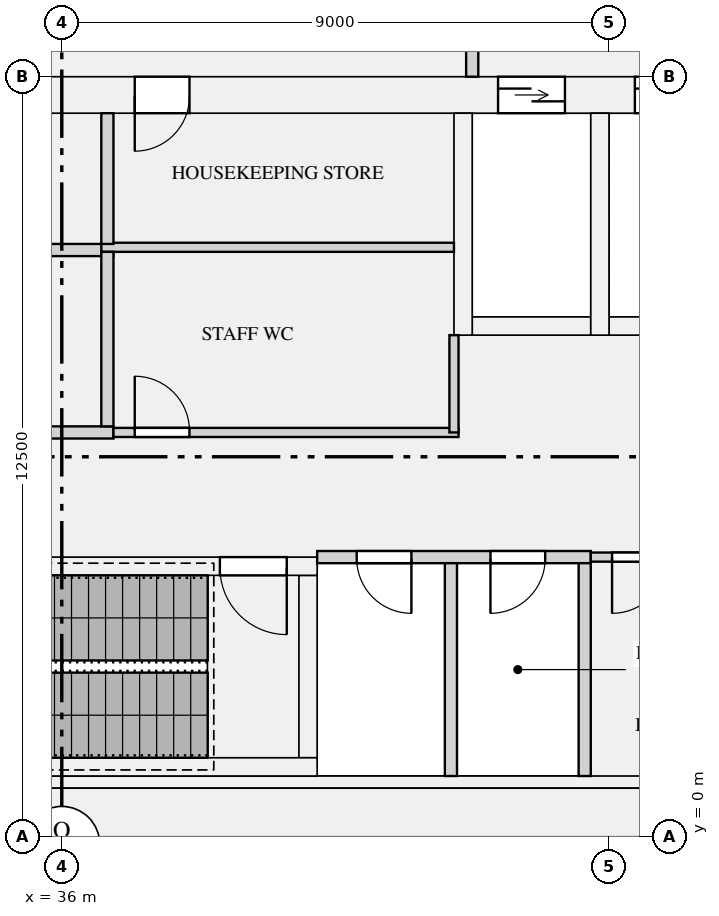
"""IFC4 building model, lengths in metres.
Left out: names, types, materials, properties, quantities, classifications, styles, units other than length and angle.
Written with IfcOpenShell. Run it as: python <this file> out.ifc"""

import sys

from ifc_helpers import new_model, si_unit, direction, frame, frame_2d, origin, place, context, subcontext, project, spatial, rectangle, extrude, element, fill, save


model = new_model("IFC4")
c1 = context("Model", 3, precision=1e-05, world=origin(), true_north=direction((0.0, 1.0)))
c2 = subcontext(c1, "Body", "Model", "MODEL_VIEW")
j1 = project(units=[si_unit("LENGTHUNIT", "METRE"), si_unit("PLANEANGLEUNIT", "RADIAN")], contexts=[c1])
p1 = place(None, origin())
s1 = spatial("IfcSite", under=j1, at=p1, CompositionType="ELEMENT")
p2 = place(p1, origin())
s2 = spatial("IfcBuilding", under=s1, at=p2, CompositionType="ELEMENT")
p3 = place(p2, frame((0.0, 0.0, 137.1)))
s3 = spatial("IfcBuildingStorey", under=s2, at=p3, CompositionType="ELEMENT", Elevation=137.1)
p4 = place(p3, frame((18.8, 0.4, 0.0), z_axis=(0.0, 0.0, 1.0), x_axis=(1.0, 0.0, 0.0)))
e1 = element("IfcWall", 1, at=p4, inside=s3, PredefinedType="SHEAR", context=c2, shape_type="SweptSolid", body=[
    extrude(rectangle(XDim=34.4, YDim=0.8, at=frame_2d((17.2, 0.0))), origin(), (0.0, 0.0, 1.0), 4.2),
])
p5 = place(p3, frame((18.8, 12.2, 0.0), z_axis=(0.0, 0.0, 1.0), x_axis=(1.0, 0.0, 0.0)))
e2 = element("IfcWall", 2, at=p5, inside=s3, PredefinedType="SHEAR", context=c2, shape_type="SweptSolid", body=[
    extrude(rectangle(XDim=34.4, YDim=0.6, at=frame_2d((17.2, 0.0))), origin(), (0.0, 0.0, 1.0), 4.2),
])
p6 = place(p5, frame((24.375, 0.0, 0.0)))
e3 = element("IfcOpeningElement", 3, at=p6, cuts=e2, PredefinedType="OPENING", context=c2, shape_type="SweptSolid", body=[
    extrude(rectangle(XDim=1.1, YDim=2.1, at=frame_2d((0.55, 1.05))), frame((0.0, 0.31, 0.0), z_axis=(0.0, -1.0, 0.0), x_axis=(1.0, 0.0, 0.0)), (0.0, 0.0, 1.0), 0.62),
])
p7 = place(p5, frame((26.625, 0.0, 0.0)))
e4 = element("IfcOpeningElement", 4, at=p7, cuts=e2, PredefinedType="OPENING", context=c2, shape_type="SweptSolid", body=[
    extrude(rectangle(XDim=1.1, YDim=2.1, at=frame_2d((0.55, 1.05))), frame((0.0, 0.31, 0.0), z_axis=(0.0, -1.0, 0.0), x_axis=(1.0, 0.0, 0.0)), (0.0, 0.0, 1.0), 0.62),
])
p8 = place(p5, frame((28.875, 0.0, 0.0)))
e5 = element("IfcOpeningElement", 5, at=p8, cuts=e2, PredefinedType="OPENING", context=c2, shape_type="SweptSolid", body=[
    extrude(rectangle(XDim=1.1, YDim=2.1, at=frame_2d((0.55, 1.05))), frame((0.0, 0.31, 0.0), z_axis=(0.0, -1.0, 0.0), x_axis=(1.0, 0.0, 0.0)), (0.0, 0.0, 1.0), 0.62),
])
p9 = place(p5, frame((18.4, 0.0, 0.0)))
e6 = element("IfcOpeningElement", 6, at=p9, cuts=e2, PredefinedType="OPENING", context=c2, shape_type="SweptSolid", body=[
    extrude(rectangle(XDim=0.9, YDim=2.1, at=frame_2d((0.45, 1.05))), frame((0.0, 0.31, 0.0), z_axis=(0.0, -1.0, 0.0), x_axis=(1.0, 0.0, 0.0)), (0.0, 0.0, 1.0), 0.62),
])
p10 = place(p5, frame((4.45, 0.0, 0.0)))
e7 = element("IfcOpeningElement", 7, at=p10, cuts=e2, PredefinedType="OPENING", context=c2, shape_type="SweptSolid", body=[
    extrude(rectangle(XDim=0.9, YDim=2.1, at=frame_2d((0.45, 1.05))), frame((0.0, 0.31, 0.0), z_axis=(0.0, -1.0, 0.0), x_axis=(1.0, 0.0, 0.0)), (0.0, 0.0, 1.0), 0.62),
])
p11 = place(p5, frame((1.35, 0.0, 0.0)))
e8 = element("IfcOpeningElement", 8, at=p11, cuts=e2, PredefinedType="OPENING", context=c2, shape_type="SweptSolid", body=[
    extrude(rectangle(XDim=1.2, YDim=2.1, at=frame_2d((0.6, 1.05))), frame((0.0, 0.31, 0.0), z_axis=(0.0, -1.0, 0.0), x_axis=(1.0, 0.0, 0.0)), (0.0, 0.0, 1.0), 0.62),
])
p12 = place(p5, frame((31.85, 0.0, 0.0)))
e9 = element("IfcOpeningElement", 9, at=p12, cuts=e2, PredefinedType="OPENING", context=c2, shape_type="SweptSolid", body=[
    extrude(rectangle(XDim=1.2, YDim=2.1, at=frame_2d((0.6, 1.05))), frame((0.0, 0.31, 0.0), z_axis=(0.0, -1.0, 0.0), x_axis=(1.0, 0.0, 0.0)), (0.0, 0.0, 1.0), 0.62),
])
p13 = place(p3, frame((18.8, 0.9, 0.0), z_axis=(0.0, 0.0, 1.0), x_axis=(1.0, 0.0, 0.0)))
e10 = element("IfcWall", 10, at=p13, inside=s3, PredefinedType="SHEAR", context=c2, shape_type="SweptSolid", body=[
    extrude(rectangle(XDim=34.4, YDim=0.2, at=frame_2d((17.2, 0.0))), origin(), (0.0, 0.0, 1.0), 4.2),
])
p14 = place(p3, frame((42.75, 8.4, 0.0), z_axis=(0.0, 0.0, 1.0), x_axis=(1.0, 0.0, 0.0)))
e11 = element("IfcWall", 11, at=p14, inside=s3, PredefinedType="SHEAR", context=c2, shape_type="SweptSolid", body=[
    extrude(rectangle(XDim=1.95, YDim=0.3, at=frame_2d((0.975, 0.0))), origin(), (0.0, 0.0, 1.0), 4.2),
])
p15 = place(p3, frame((42.6, 8.25, 0.0), z_axis=(0.0, 0.0, 1.0), x_axis=(0.0, 1.0, 0.0)))
e12 = element("IfcWall", 12, at=p15, inside=s3, PredefinedType="SHEAR", context=c2, shape_type="SweptSolid", body=[
    extrude(rectangle(XDim=3.65, YDim=0.3, at=frame_2d((1.825, 0.0))), origin(), (0.0, 0.0, 1.0), 4.2),
])
p16 = place(p3, frame((45.0, 8.4, 0.0), z_axis=(0.0, 0.0, 1.0), x_axis=(1.0, 0.0, 0.0)))
e13 = element("IfcWall", 13, at=p16, inside=s3, PredefinedType="SHEAR", context=c2, shape_type="SweptSolid", body=[
    extrude(rectangle(XDim=1.95, YDim=0.3, at=frame_2d((0.975, 0.0))), origin(), (0.0, 0.0, 1.0), 4.2),
])
p17 = place(p3, frame((44.85, 8.25, 0.0), z_axis=(0.0, 0.0, 1.0), x_axis=(0.0, 1.0, 0.0)))
e14 = element("IfcWall", 14, at=p17, inside=s3, PredefinedType="SHEAR", context=c2, shape_type="SweptSolid", body=[
    extrude(rectangle(XDim=3.65, YDim=0.3, at=frame_2d((1.825, 0.0))), origin(), (0.0, 0.0, 1.0), 4.2),
])
p18 = place(p3, frame((31.8, 1.15, 0.0), z_axis=(0.0, 0.0, 1.0), x_axis=(1.0, 0.0, 0.0)))
e15 = element("IfcWall", 15, at=p18, inside=s3, PredefinedType="SHEAR", context=c2, shape_type="SweptSolid", body=[
    extrude(rectangle(XDim=8.4, YDim=0.3, at=frame_2d((4.2, 0.0))), origin(), (0.0, 0.0, 1.0), 4.2),
])
p19 = place(p3, frame((31.8, 4.45, 0.0), z_axis=(0.0, 0.0, 1.0), x_axis=(1.0, 0.0, 0.0)))
e16 = element("IfcWall", 16, at=p19, inside=s3, PredefinedType="SHEAR", context=c2, shape_type="SweptSolid", body=[
    extrude(rectangle(XDim=8.4, YDim=0.3, at=frame_2d((4.2, 0.0))), origin(), (0.0, 0.0, 1.0), 4.2),
])
p20 = place(p19, frame((6.8, 0.0, 0.0)))
e17 = element("IfcOpeningElement", 17, at=p20, cuts=e16, PredefinedType="OPENING", context=c2, shape_type="SweptSolid", body=[
    extrude(rectangle(XDim=1.1, YDim=2.1, at=frame_2d((0.55, 1.05))), frame((0.0, 0.16, 0.0), z_axis=(0.0, -1.0, 0.0), x_axis=(1.0, 0.0, 0.0)), (0.0, 0.0, 1.0), 0.32),
])
p21 = place(p3, frame((40.05, 1.3, 0.0), z_axis=(0.0, 0.0, 1.0), x_axis=(0.0, 1.0, 0.0)))
e18 = element("IfcWall", 18, at=p21, inside=s3, PredefinedType="SHEAR", context=c2, shape_type="SweptSolid", body=[
    extrude(rectangle(XDim=3.0, YDim=0.3, at=frame_2d((1.5, 0.0))), origin(), (0.0, 0.0, 1.0), 4.2),
])
p22 = place(p3, frame((40.2, 4.6, 0.0), z_axis=(0.0, 0.0, 1.0), x_axis=(1.0, 0.0, 0.0)))
e19 = element("IfcWall", 19, at=p22, inside=s3, PredefinedType="PARTITIONING", context=c2, shape_type="SweptSolid", body=[
    extrude(rectangle(XDim=4.5, YDim=0.2, at=frame_2d((2.25, 0.0))), origin(), (0.0, 0.0, 1.0), 3.7),
])
p23 = place(p22, frame((0.65, 0.0, 0.0)))
e20 = element("IfcOpeningElement", 20, at=p23, cuts=e19, PredefinedType="OPENING", context=c2, shape_type="SweptSolid", body=[
    extrude(rectangle(XDim=0.9, YDim=2.1, at=frame_2d((0.45, 1.05))), frame((0.0, 0.11, 0.0), z_axis=(0.0, -1.0, 0.0), x_axis=(1.0, 0.0, 0.0)), (0.0, 0.0, 1.0), 0.22),
])
p24 = place(p22, frame((2.85, 0.0, 0.0)))
e21 = element("IfcOpeningElement", 21, at=p24, cuts=e19, PredefinedType="OPENING", context=c2, shape_type="SweptSolid", body=[
    extrude(rectangle(XDim=0.9, YDim=2.1, at=frame_2d((0.45, 1.05))), frame((0.0, 0.11, 0.0), z_axis=(0.0, -1.0, 0.0), x_axis=(1.0, 0.0, 0.0)), (0.0, 0.0, 1.0), 0.22),
])
p25 = place(p3, frame((44.7, 4.6, 0.0), z_axis=(0.0, 0.0, 1.0), x_axis=(1.0, 0.0, 0.0)))
e22 = element("IfcWall", 22, at=p25, inside=s3, PredefinedType="PARTITIONING", context=c2, shape_type="SweptSolid", body=[
    extrude(rectangle(XDim=2.675, YDim=0.15, at=frame_2d((1.337, 0.0))), origin(), (0.0, 0.0, 1.0), 3.7),
])
p26 = place(p25, frame((0.35, 0.0, 0.0)))
e23 = element("IfcOpeningElement", 23, at=p26, cuts=e22, PredefinedType="OPENING", context=c2, shape_type="SweptSolid", body=[
    extrude(rectangle(XDim=0.9, YDim=2.1, at=frame_2d((0.45, 1.05))), frame((0.0, 0.085, 0.0), z_axis=(0.0, -1.0, 0.0), x_axis=(1.0, 0.0, 0.0)), (0.0, 0.0, 1.0), 0.17),
])
p27 = place(p3, frame((22.7, 6.65, 0.0), z_axis=(0.0, 0.0, 1.0), x_axis=(1.0, 0.0, 0.0)))
e24 = element("IfcWall", 24, at=p27, inside=s3, PredefinedType="PARTITIONING", context=c2, shape_type="SweptSolid", body=[
    extrude(rectangle(XDim=14.15, YDim=0.2, at=frame_2d((7.075, 0.0))), origin(), (0.0, 0.0, 1.0), 3.7),
])
p28 = place(p27, frame((0.55, 0.0, 0.0)))
e25 = element("IfcOpeningElement", 25, at=p28, cuts=e24, PredefinedType="OPENING", context=c2, shape_type="SweptSolid", body=[
    extrude(rectangle(XDim=0.9, YDim=2.1, at=frame_2d((0.45, 1.05))), frame((0.0, 0.11, 0.0), z_axis=(0.0, -1.0, 0.0), x_axis=(1.0, 0.0, 0.0)), (0.0, 0.0, 1.0), 0.22),
])
p29 = place(p3, frame((36.85, 6.65, 0.0), z_axis=(0.0, 0.0, 1.0), x_axis=(1.0, 0.0, 0.0)))
e26 = element("IfcWall", 26, at=p29, inside=s3, PredefinedType="PARTITIONING", context=c2, shape_type="SweptSolid", body=[
    extrude(rectangle(XDim=5.675, YDim=0.15, at=frame_2d((2.837, 0.0))), origin(), (0.0, 0.0, 1.0), 3.7),
])
p30 = place(p29, frame((0.35, 0.0, 0.0)))
e27 = element("IfcOpeningElement", 27, at=p30, cuts=e26, PredefinedType="OPENING", context=c2, shape_type="SweptSolid", body=[
    extrude(rectangle(XDim=0.9, YDim=2.1, at=frame_2d((0.45, 1.05))), frame((0.0, 0.085, 0.0), z_axis=(0.0, -1.0, 0.0), x_axis=(1.0, 0.0, 0.0)), (0.0, 0.0, 1.0), 0.17),
])
p31 = place(p3, frame((22.7, 9.65, 0.0), z_axis=(0.0, 0.0, 1.0), x_axis=(1.0, 0.0, 0.0)))
e28 = element("IfcWall", 28, at=p31, inside=s3, PredefinedType="PARTITIONING", context=c2, shape_type="SweptSolid", body=[
    extrude(rectangle(XDim=14.15, YDim=0.2, at=frame_2d((7.075, 0.0))), origin(), (0.0, 0.0, 1.0), 3.7),
])
p32 = place(p3, frame((36.65, 9.695, 0.0), z_axis=(0.0, 0.0, 1.0), x_axis=(1.0, 0.0, 0.0)))
e29 = element("IfcWall", 29, at=p32, inside=s3, PredefinedType="PARTITIONING", context=c2, shape_type="SweptSolid", body=[
    extrude(rectangle(XDim=5.8, YDim=0.15, at=frame_2d((2.9, 0.0))), origin(), (0.0, 0.0, 1.0), 3.7),
])
for number, where, z_axis, x_axis in (
    (30, (42.4, 1.0, 0.0), (0.0, 0.0, 1.0), (0.0, 1.0, 0.0)),
    (31, (44.6, 1.0, 0.0), (0.0, 0.0, 1.0), (0.0, 1.0, 0.0)),
):
    element("IfcWall", number, at=place(p3, frame(where, z_axis=z_axis, x_axis=x_axis)), inside=s3, PredefinedType="PARTITIONING", context=c2, shape_type="SweptSolid", body=[
        extrude(rectangle(XDim=3.5, YDim=0.2, at=frame_2d((1.75, 0.0))), origin(), (0.0, 0.0, 1.0), 3.7),
    ])
p33 = place(p3, frame((42.45, 6.65, 0.0), z_axis=(0.0, 0.0, 1.0), x_axis=(0.0, 1.0, 0.0)))
e32 = element("IfcWall", 32, at=p33, inside=s3, PredefinedType="PARTITIONING", context=c2, shape_type="SweptSolid", body=[
    extrude(rectangle(XDim=1.6, YDim=0.15, at=frame_2d((0.8, 0.0))), origin(), (0.0, 0.0, 1.0), 3.7),
])
p34 = place(p3, frame((36.75, 6.75, 0.0), z_axis=(0.0, 0.0, 1.0), x_axis=(0.0, 1.0, 0.0)))
e33 = element("IfcWall", 33, at=p34, inside=s3, PredefinedType="PARTITIONING", context=c2, shape_type="SweptSolid", body=[
    extrude(rectangle(XDim=2.87, YDim=0.2, at=frame_2d((1.435, 0.0))), origin(), (0.0, 0.0, 1.0), 3.7),
])
p35 = place(p3, frame((36.75, 9.75, 0.0), z_axis=(0.0, 0.0, 1.0), x_axis=(0.0, 1.0, 0.0)))
e34 = element("IfcWall", 34, at=p35, inside=s3, PredefinedType="PARTITIONING", context=c2, shape_type="SweptSolid", body=[
    extrude(rectangle(XDim=2.15, YDim=0.2, at=frame_2d((1.075, 0.0))), origin(), (0.0, 0.0, 1.0), 3.7),
])
p36 = place(p3, frame((42.75, 12.5, 0.0), z_axis=(0.0, 0.0, 1.0), x_axis=(0.0, 1.0, 0.0)))
e35 = element("IfcWall", 35, at=p36, inside=s3, PredefinedType="PARTITIONING", context=c2, shape_type="SweptSolid", body=[
    extrude(rectangle(XDim=3.4, YDim=0.2, at=frame_2d((1.7, 0.0))), origin(), (0.0, 0.0, 1.0), 3.7),
])
p37 = place(p36, frame((2.2, 0.0, 0.0)))
e36 = element("IfcOpeningElement", 36, at=p37, cuts=e35, PredefinedType="OPENING", context=c2, shape_type="SweptSolid", body=[
    extrude(rectangle(XDim=1.0, YDim=2.1, at=frame_2d((0.5, 1.05))), frame((0.0, 0.11, 0.0), z_axis=(0.0, -1.0, 0.0), x_axis=(1.0, 0.0, 0.0)), (0.0, 0.0, 1.0), 0.22),
])
p38 = place(p6, origin())
e37 = element("IfcDoor", 37, at=p38, inside=s3, OperationType="DOUBLE_DOOR_SLIDING", PredefinedType="DOOR", context=c2, shape_type="SweptSolid", body=[
    extrude(rectangle(XDim=1.1, YDim=2.1, at=frame_2d((0.55, 1.05))), frame((0.0, 0.025, 0.0), z_axis=(0.0, -1.0, 0.0), x_axis=(1.0, 0.0, 0.0)), (0.0, 0.0, 1.0), 0.05),
])
fill(e3, e37)
p39 = place(p7, origin())
e38 = element("IfcDoor", 38, at=p39, inside=s3, OperationType="DOUBLE_DOOR_SLIDING", PredefinedType="DOOR", context=c2, shape_type="SweptSolid", body=[
    extrude(rectangle(XDim=1.1, YDim=2.1, at=frame_2d((0.55, 1.05))), frame((0.0, 0.025, 0.0), z_axis=(0.0, -1.0, 0.0), x_axis=(1.0, 0.0, 0.0)), (0.0, 0.0, 1.0), 0.05),
])
fill(e4, e38)
p40 = place(p20, frame((1.1, 0.0, 0.0), z_axis=(0.0, 0.0, 1.0), x_axis=(-1.0, 0.0, 0.0)))
e39 = element("IfcDoor", 39, at=p40, inside=s3, OperationType="SINGLE_SWING_LEFT", PredefinedType="DOOR", context=c2, shape_type="SweptSolid", body=[
    extrude(rectangle(XDim=1.1, YDim=2.1, at=frame_2d((0.55, 1.05))), frame((0.0, 0.025, 0.0), z_axis=(0.0, -1.0, 0.0), x_axis=(1.0, 0.0, 0.0)), (0.0, 0.0, 1.0), 0.05),
])
fill(e17, e39)
p41 = place(p26, frame((0.9, 0.0, 0.0), z_axis=(0.0, 0.0, 1.0), x_axis=(-1.0, 0.0, 0.0)))
e40 = element("IfcDoor", 40, at=p41, inside=s3, OperationType="SINGLE_SWING_RIGHT", PredefinedType="DOOR", context=c2, shape_type="SweptSolid", body=[
    extrude(rectangle(XDim=0.9, YDim=2.1, at=frame_2d((0.45, 1.05))), frame((0.0, 0.025, 0.0), z_axis=(0.0, -1.0, 0.0), x_axis=(1.0, 0.0, 0.0)), (0.0, 0.0, 1.0), 0.05),
])
fill(e23, e40)
p42 = place(p30, origin())
e41 = element("IfcDoor", 41, at=p42, inside=s3, OperationType="SINGLE_SWING_LEFT", PredefinedType="DOOR", context=c2, shape_type="SweptSolid", body=[
    extrude(rectangle(XDim=0.9, YDim=2.1, at=frame_2d((0.45, 1.05))), frame((0.0, 0.025, 0.0), z_axis=(0.0, -1.0, 0.0), x_axis=(1.0, 0.0, 0.0)), (0.0, 0.0, 1.0), 0.05),
])
fill(e27, e41)
p43 = place(p9, frame((0.9, 0.0, 0.0), z_axis=(0.0, 0.0, 1.0), x_axis=(-1.0, 0.0, 0.0)))
e42 = element("IfcDoor", 42, at=p43, inside=s3, OperationType="SINGLE_SWING_RIGHT", PredefinedType="DOOR", context=c2, shape_type="SweptSolid", body=[
    extrude(rectangle(XDim=0.9, YDim=2.1, at=frame_2d((0.45, 1.05))), frame((0.0, 0.025, 0.0), z_axis=(0.0, -1.0, 0.0), x_axis=(1.0, 0.0, 0.0)), (0.0, 0.0, 1.0), 0.05),
])
fill(e6, e42)
p44 = place(p23, frame((0.9, 0.0, 0.0), z_axis=(0.0, 0.0, 1.0), x_axis=(-1.0, 0.0, 0.0)))
e43 = element("IfcDoor", 43, at=p44, inside=s3, OperationType="SINGLE_SWING_LEFT", PredefinedType="DOOR", context=c2, shape_type="SweptSolid", body=[
    extrude(rectangle(XDim=0.9, YDim=2.1, at=frame_2d((0.45, 1.05))), frame((0.0, 0.025, 0.0), z_axis=(0.0, -1.0, 0.0), x_axis=(1.0, 0.0, 0.0)), (0.0, 0.0, 1.0), 0.05),
])
fill(e20, e43)
p45 = place(p24, frame((0.9, 0.0, 0.0), z_axis=(0.0, 0.0, 1.0), x_axis=(-1.0, 0.0, 0.0)))
e44 = element("IfcDoor", 44, at=p45, inside=s3, OperationType="SINGLE_SWING_RIGHT", PredefinedType="DOOR", context=c2, shape_type="SweptSolid", body=[
    extrude(rectangle(XDim=0.9, YDim=2.1, at=frame_2d((0.45, 1.05))), frame((0.0, 0.025, 0.0), z_axis=(0.0, -1.0, 0.0), x_axis=(1.0, 0.0, 0.0)), (0.0, 0.0, 1.0), 0.05),
])
fill(e21, e44)
save(model, sys.argv[1])
